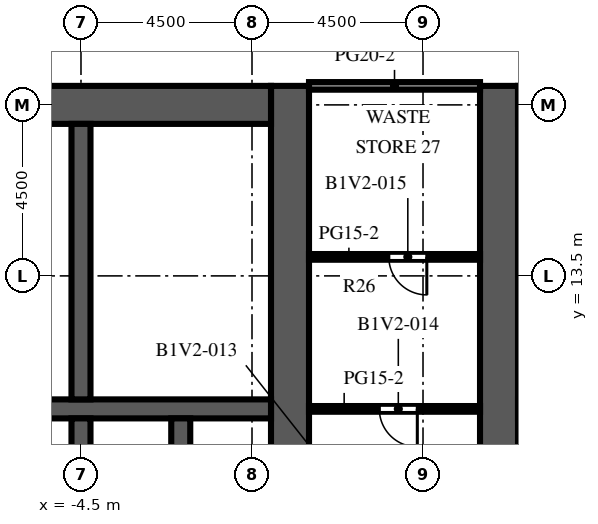
"""IFC4 building model, lengths in metres.
Left out: names, types, materials, properties, quantities, classifications, styles, units other than length and angle.
Written with IfcOpenShell. Run it as: python <this file> out.ifc"""

import sys

from ifc_helpers import new_model, si_unit, direction, frame, frame_2d, origin, place, context, subcontext, project, spatial, rectangle, extrude, element, fill, save


model = new_model("IFC4")
c1 = context("Model", 3, precision=1e-05, world=origin(), true_north=direction((0.0, 1.0)))
c2 = subcontext(c1, "Body", "Model", "MODEL_VIEW")
j1 = project(units=[si_unit("LENGTHUNIT", "METRE"), si_unit("PLANEANGLEUNIT", "RADIAN")], contexts=[c1])
p1 = place(None, origin())
s1 = spatial("IfcSite", under=j1, at=p1, CompositionType="ELEMENT")
p2 = place(p1, origin())
s2 = spatial("IfcBuilding", under=s1, at=p2, CompositionType="ELEMENT")
p3 = place(p2, frame((0.0, 0.0, 31.8)))
s3 = spatial("IfcBuildingStorey", under=s2, at=p3, CompositionType="ELEMENT", Elevation=31.8)
p4 = place(p3, frame((1.0, -9.0, 0.0), z_axis=(0.0, 0.0, 1.0), x_axis=(0.0, 1.0, 0.0)))
e1 = element("IfcWall", 1, at=p4, inside=s3, PredefinedType="SHEAR", context=c2, shape_type="SweptSolid", body=[
    extrude(rectangle(XDim=27.5, YDim=1.0, at=frame_2d((13.75, 0.0))), origin(), (0.0, 0.0, 1.0), 4.1),
])
p5 = place(p4, frame((12.55, 0.0, 0.0)))
e2 = element("IfcOpeningElement", 2, at=p5, cuts=e1, PredefinedType="OPENING", context=c2, shape_type="SweptSolid", body=[
    extrude(rectangle(XDim=2.4, YDim=2.4, at=frame_2d((1.2, 1.2))), frame((0.0, 0.51, 0.0), z_axis=(0.0, -1.0, 0.0), x_axis=(1.0, 0.0, 0.0)), (0.0, 0.0, 1.0), 1.02),
])
p6 = place(p4, frame((4.025, 0.0, 0.0)))
e3 = element("IfcOpeningElement", 3, at=p6, cuts=e1, PredefinedType="OPENING", context=c2, shape_type="SweptSolid", body=[
    extrude(rectangle(XDim=1.2, YDim=2.1, at=frame_2d((0.6, 1.05))), frame((0.0, 0.51, 0.0), z_axis=(0.0, -1.0, 0.0), x_axis=(1.0, 0.0, 0.0)), (0.0, 0.0, 1.0), 1.02),
])
p7 = place(p4, frame((19.475, 0.0, 0.0)))
e4 = element("IfcOpeningElement", 4, at=p7, cuts=e1, PredefinedType="OPENING", context=c2, shape_type="SweptSolid", body=[
    extrude(rectangle(XDim=1.0, YDim=2.1, at=frame_2d((0.5, 1.05))), frame((0.0, 0.51, 0.0), z_axis=(0.0, -1.0, 0.0), x_axis=(1.0, 0.0, 0.0)), (0.0, 0.0, 1.0), 1.02),
])
p8 = place(p4, frame((21.106, 0.0, 0.0)))
e5 = element("IfcOpeningElement", 5, at=p8, cuts=e1, PredefinedType="OPENING", context=c2, shape_type="SweptSolid", body=[
    extrude(rectangle(XDim=1.0, YDim=2.1, at=frame_2d((0.5, 1.05))), frame((0.0, 0.51, 0.0), z_axis=(0.0, -1.0, 0.0), x_axis=(1.0, 0.0, 0.0)), (0.0, 0.0, 1.0), 1.02),
])
p9 = place(p4, frame((23.1, 0.0, 0.0)))
e6 = element("IfcOpeningElement", 6, at=p9, cuts=e1, PredefinedType="OPENING", context=c2, shape_type="SweptSolid", body=[
    extrude(rectangle(XDim=1.0, YDim=2.1, at=frame_2d((0.5, 1.05))), frame((0.0, 0.51, 0.0), z_axis=(0.0, -1.0, 0.0), x_axis=(1.0, 0.0, 0.0)), (0.0, 0.0, 1.0), 1.02),
])
p10 = place(p4, frame((25.094, 0.0, 0.0)))
e7 = element("IfcOpeningElement", 7, at=p10, cuts=e1, PredefinedType="OPENING", context=c2, shape_type="SweptSolid", body=[
    extrude(rectangle(XDim=1.0, YDim=2.1, at=frame_2d((0.5, 1.05))), frame((0.0, 0.51, 0.0), z_axis=(0.0, -1.0, 0.0), x_axis=(1.0, 0.0, 0.0)), (0.0, 0.0, 1.0), 1.02),
])
p11 = place(p3, frame((-9.5, 18.0, 0.0), z_axis=(0.0, 0.0, 1.0), x_axis=(1.0, 0.0, 0.0)))
e8 = element("IfcWall", 8, at=p11, inside=s3, PredefinedType="SHEAR", context=c2, shape_type="SweptSolid", body=[
    extrude(rectangle(XDim=10.0, YDim=1.0, at=frame_2d((5.0, 0.0))), origin(), (0.0, 0.0, 1.0), 4.1),
])
p12 = place(p3, frame((-9.5, 10.0, 0.0), z_axis=(0.0, 0.0, 1.0), x_axis=(1.0, 0.0, 0.0)))
e9 = element("IfcWall", 9, at=p12, inside=s3, PredefinedType="SHEAR", context=c2, shape_type="SweptSolid", body=[
    extrude(rectangle(XDim=10.0, YDim=0.5, at=frame_2d((5.0, 0.0))), origin(), (0.0, 0.0, 1.0), 4.1),
])
for number, where, z_axis, x_axis in (
    (10, (-4.5, 6.95, 0.0), (0.0, 0.0, 1.0), (0.0, 1.0, 0.0)),
    (11, (-1.875, 6.95, 0.0), (0.0, 0.0, 1.0), (0.0, 1.0, 0.0)),
):
    element("IfcWall", number, at=place(p3, frame(where, z_axis=z_axis, x_axis=x_axis)), inside=s3, PredefinedType="SHEAR", context=c2, shape_type="SweptSolid", body=[
        extrude(rectangle(XDim=2.8, YDim=0.5, at=frame_2d((1.4, 0.0))), origin(), (0.0, 0.0, 1.0), 4.1),
    ])
p13 = place(p3, frame((-4.5, 10.25, 0.0), z_axis=(0.0, 0.0, 1.0), x_axis=(0.0, 1.0, 0.0)))
e12 = element("IfcWall", 12, at=p13, inside=s3, PredefinedType="SHEAR", context=c2, shape_type="SweptSolid", body=[
    extrude(rectangle(XDim=7.25, YDim=0.5, at=frame_2d((3.625, 0.0))), origin(), (0.0, 0.0, 1.0), 4.1),
])
p14 = place(p3, frame((6.5, -9.0, 0.0), z_axis=(0.0, 0.0, 1.0), x_axis=(0.0, 1.0, 0.0)))
e13 = element("IfcWall", 13, at=p14, inside=s3, PredefinedType="SHEAR", context=c2, shape_type="SweptSolid", body=[
    extrude(rectangle(XDim=27.5, YDim=1.0, at=frame_2d((13.75, 0.0))), origin(), (0.0, 0.0, 1.0), 4.1),
])
p15 = place(p14, frame((12.55, 0.0, 0.0)))
e14 = element("IfcOpeningElement", 14, at=p15, cuts=e13, PredefinedType="OPENING", context=c2, shape_type="SweptSolid", body=[
    extrude(rectangle(XDim=2.4, YDim=2.4, at=frame_2d((1.2, 1.2))), frame((0.0, 0.51, 0.0), z_axis=(0.0, -1.0, 0.0), x_axis=(1.0, 0.0, 0.0)), (0.0, 0.0, 1.0), 1.02),
])
p16 = place(p14, frame((4.025, 0.0, 0.0)))
e15 = element("IfcOpeningElement", 15, at=p16, cuts=e13, PredefinedType="OPENING", context=c2, shape_type="SweptSolid", body=[
    extrude(rectangle(XDim=1.2, YDim=2.1, at=frame_2d((0.6, 1.05))), frame((0.0, 0.51, 0.0), z_axis=(0.0, -1.0, 0.0), x_axis=(1.0, 0.0, 0.0)), (0.0, 0.0, 1.0), 1.02),
])
p17 = place(p14, frame((19.475, 0.0, 0.0)))
e16 = element("IfcOpeningElement", 16, at=p17, cuts=e13, PredefinedType="OPENING", context=c2, shape_type="SweptSolid", body=[
    extrude(rectangle(XDim=1.0, YDim=2.1, at=frame_2d((0.5, 1.05))), frame((0.0, 0.51, 0.0), z_axis=(0.0, -1.0, 0.0), x_axis=(1.0, 0.0, 0.0)), (0.0, 0.0, 1.0), 1.02),
])
p18 = place(p14, frame((21.106, 0.0, 0.0)))
e17 = element("IfcOpeningElement", 17, at=p18, cuts=e13, PredefinedType="OPENING", context=c2, shape_type="SweptSolid", body=[
    extrude(rectangle(XDim=1.0, YDim=2.1, at=frame_2d((0.5, 1.05))), frame((0.0, 0.51, 0.0), z_axis=(0.0, -1.0, 0.0), x_axis=(1.0, 0.0, 0.0)), (0.0, 0.0, 1.0), 1.02),
])
p19 = place(p14, frame((23.1, 0.0, 0.0)))
e18 = element("IfcOpeningElement", 18, at=p19, cuts=e13, PredefinedType="OPENING", context=c2, shape_type="SweptSolid", body=[
    extrude(rectangle(XDim=1.0, YDim=2.1, at=frame_2d((0.5, 1.05))), frame((0.0, 0.51, 0.0), z_axis=(0.0, -1.0, 0.0), x_axis=(1.0, 0.0, 0.0)), (0.0, 0.0, 1.0), 1.02),
])
p20 = place(p14, frame((25.094, 0.0, 0.0)))
e19 = element("IfcOpeningElement", 19, at=p20, cuts=e13, PredefinedType="OPENING", context=c2, shape_type="SweptSolid", body=[
    extrude(rectangle(XDim=1.0, YDim=2.1, at=frame_2d((0.5, 1.05))), frame((0.0, 0.51, 0.0), z_axis=(0.0, -1.0, 0.0), x_axis=(1.0, 0.0, 0.0)), (0.0, 0.0, 1.0), 1.02),
])
for number, where, z_axis, x_axis in (
    (20, (-4.25, 11.7, 0.0), (0.0, 0.0, 1.0), (1.0, 0.0, 0.0)),
    (21, (-4.25, 13.512, 0.0), (0.0, 0.0, 1.0), (1.0, 0.0, 0.0)),
    (22, (-4.25, 15.688, 0.0), (0.0, 0.0, 1.0), (1.0, 0.0, 0.0)),
):
    element("IfcWall", number, at=place(p3, frame(where, z_axis=z_axis, x_axis=x_axis)), inside=s3, PredefinedType="PARTITIONING", context=c2, shape_type="SweptSolid", body=[
        extrude(rectangle(XDim=4.75, YDim=0.1, at=frame_2d((2.375, 0.0))), origin(), (0.0, 0.0, 1.0), 3.5),
    ])
p21 = place(p3, frame((1.5, 10.0, 0.0), z_axis=(0.0, 0.0, 1.0), x_axis=(1.0, 0.0, 0.0)))
e23 = element("IfcWall", 23, at=p21, inside=s3, PredefinedType="PARTITIONING", context=c2, shape_type="SweptSolid", body=[
    extrude(rectangle(XDim=4.5, YDim=0.15, at=frame_2d((2.25, 0.0))), origin(), (0.0, 0.0, 1.0), 3.5),
])
p22 = place(p21, frame((1.85, 0.0, 0.0)))
e24 = element("IfcOpeningElement", 24, at=p22, cuts=e23, PredefinedType="OPENING", context=c2, shape_type="SweptSolid", body=[
    extrude(rectangle(XDim=1.0, YDim=2.1, at=frame_2d((0.5, 1.05))), frame((0.0, 0.085, 0.0), z_axis=(0.0, -1.0, 0.0), x_axis=(1.0, 0.0, 0.0)), (0.0, 0.0, 1.0), 0.17),
])
p23 = place(p3, frame((1.5, 14.0, 0.0), z_axis=(0.0, 0.0, 1.0), x_axis=(1.0, 0.0, 0.0)))
e25 = element("IfcWall", 25, at=p23, inside=s3, PredefinedType="PARTITIONING", context=c2, shape_type="SweptSolid", body=[
    extrude(rectangle(XDim=4.5, YDim=0.15, at=frame_2d((2.25, 0.0))), origin(), (0.0, 0.0, 1.0), 3.5),
])
p24 = place(p23, frame((2.1, 0.0, 0.0)))
e26 = element("IfcOpeningElement", 26, at=p24, cuts=e25, PredefinedType="OPENING", context=c2, shape_type="SweptSolid", body=[
    extrude(rectangle(XDim=1.0, YDim=2.1, at=frame_2d((0.5, 1.05))), frame((0.0, 0.085, 0.0), z_axis=(0.0, -1.0, 0.0), x_axis=(1.0, 0.0, 0.0)), (0.0, 0.0, 1.0), 0.17),
])
p25 = place(p3, frame((1.5, 18.5, 0.0), z_axis=(0.0, 0.0, 1.0), x_axis=(1.0, 0.0, 0.0)))
e27 = element("IfcWall", 27, at=p25, inside=s3, PredefinedType="PARTITIONING", context=c2, shape_type="SweptSolid", body=[
    extrude(rectangle(XDim=4.5, YDim=0.2, at=frame_2d((2.25, 0.0))), origin(), (0.0, 0.0, 1.0), 3.5),
])
p26 = place(p7, origin())
e28 = element("IfcDoor", 28, at=p26, inside=s3, OperationType="SINGLE_SWING_LEFT", PredefinedType="DOOR", context=c2, shape_type="SweptSolid", body=[
    extrude(rectangle(XDim=1.0, YDim=2.1, at=frame_2d((0.5, 1.05))), frame((0.0, 0.475, 0.0), z_axis=(0.0, -1.0, 0.0), x_axis=(1.0, 0.0, 0.0)), (0.0, 0.0, 1.0), 0.05),
])
fill(e4, e28)
p27 = place(p8, origin())
e29 = element("IfcDoor", 29, at=p27, inside=s3, OperationType="SINGLE_SWING_RIGHT", PredefinedType="DOOR", context=c2, shape_type="SweptSolid", body=[
    extrude(rectangle(XDim=1.0, YDim=2.1, at=frame_2d((0.5, 1.05))), frame((0.0, 0.475, 0.0), z_axis=(0.0, -1.0, 0.0), x_axis=(1.0, 0.0, 0.0)), (0.0, 0.0, 1.0), 0.05),
])
fill(e5, e29)
p28 = place(p9, origin())
e30 = element("IfcDoor", 30, at=p28, inside=s3, OperationType="SINGLE_SWING_LEFT", PredefinedType="DOOR", context=c2, shape_type="SweptSolid", body=[
    extrude(rectangle(XDim=1.0, YDim=2.1, at=frame_2d((0.5, 1.05))), frame((0.0, 0.475, 0.0), z_axis=(0.0, -1.0, 0.0), x_axis=(1.0, 0.0, 0.0)), (0.0, 0.0, 1.0), 0.05),
])
fill(e6, e30)
p29 = place(p10, origin())
e31 = element("IfcDoor", 31, at=p29, inside=s3, OperationType="SINGLE_SWING_RIGHT", PredefinedType="DOOR", context=c2, shape_type="SweptSolid", body=[
    extrude(rectangle(XDim=1.0, YDim=2.1, at=frame_2d((0.5, 1.05))), frame((0.0, 0.475, 0.0), z_axis=(0.0, -1.0, 0.0), x_axis=(1.0, 0.0, 0.0)), (0.0, 0.0, 1.0), 0.05),
])
fill(e7, e31)
p30 = place(p17, origin())
e32 = element("IfcDoor", 32, at=p30, inside=s3, OperationType="SINGLE_SWING_RIGHT", PredefinedType="DOOR", context=c2, shape_type="SweptSolid", body=[
    extrude(rectangle(XDim=1.0, YDim=2.1, at=frame_2d((0.5, 1.05))), frame((0.0, -0.425, 0.0), z_axis=(0.0, -1.0, 0.0), x_axis=(1.0, 0.0, 0.0)), (0.0, 0.0, 1.0), 0.05),
])
fill(e16, e32)
p31 = place(p18, origin())
e33 = element("IfcDoor", 33, at=p31, inside=s3, OperationType="SINGLE_SWING_LEFT", PredefinedType="DOOR", context=c2, shape_type="SweptSolid", body=[
    extrude(rectangle(XDim=1.0, YDim=2.1, at=frame_2d((0.5, 1.05))), frame((0.0, -0.425, 0.0), z_axis=(0.0, -1.0, 0.0), x_axis=(1.0, 0.0, 0.0)), (0.0, 0.0, 1.0), 0.05),
])
fill(e17, e33)
p32 = place(p19, origin())
e34 = element("IfcDoor", 34, at=p32, inside=s3, OperationType="SINGLE_SWING_RIGHT", PredefinedType="DOOR", context=c2, shape_type="SweptSolid", body=[
    extrude(rectangle(XDim=1.0, YDim=2.1, at=frame_2d((0.5, 1.05))), frame((0.0, -0.425, 0.0), z_axis=(0.0, -1.0, 0.0), x_axis=(1.0, 0.0, 0.0)), (0.0, 0.0, 1.0), 0.05),
])
fill(e18, e34)
p33 = place(p20, origin())
e35 = element("IfcDoor", 35, at=p33, inside=s3, OperationType="SINGLE_SWING_LEFT", PredefinedType="DOOR", context=c2, shape_type="SweptSolid", body=[
    extrude(rectangle(XDim=1.0, YDim=2.1, at=frame_2d((0.5, 1.05))), frame((0.0, -0.425, 0.0), z_axis=(0.0, -1.0, 0.0), x_axis=(1.0, 0.0, 0.0)), (0.0, 0.0, 1.0), 0.05),
])
fill(e19, e35)
p34 = place(p22, origin())
e36 = element("IfcDoor", 36, at=p34, inside=s3, OperationType="SINGLE_SWING_RIGHT", PredefinedType="DOOR", context=c2, shape_type="SweptSolid", body=[
    extrude(rectangle(XDim=1.0, YDim=2.1, at=frame_2d((0.5, 1.05))), frame((0.0, 0.025, 0.0), z_axis=(0.0, -1.0, 0.0), x_axis=(1.0, 0.0, 0.0)), (0.0, 0.0, 1.0), 0.05),
])
fill(e24, e36)
p35 = place(p24, origin())
e37 = element("IfcDoor", 37, at=p35, inside=s3, OperationType="SINGLE_SWING_RIGHT", PredefinedType="DOOR", context=c2, shape_type="SweptSolid", body=[
    extrude(rectangle(XDim=1.0, YDim=2.1, at=frame_2d((0.5, 1.05))), frame((0.0, 0.025, 0.0), z_axis=(0.0, -1.0, 0.0), x_axis=(1.0, 0.0, 0.0)), (0.0, 0.0, 1.0), 0.05),
])
fill(e26, e37)
save(model, sys.argv[1])
